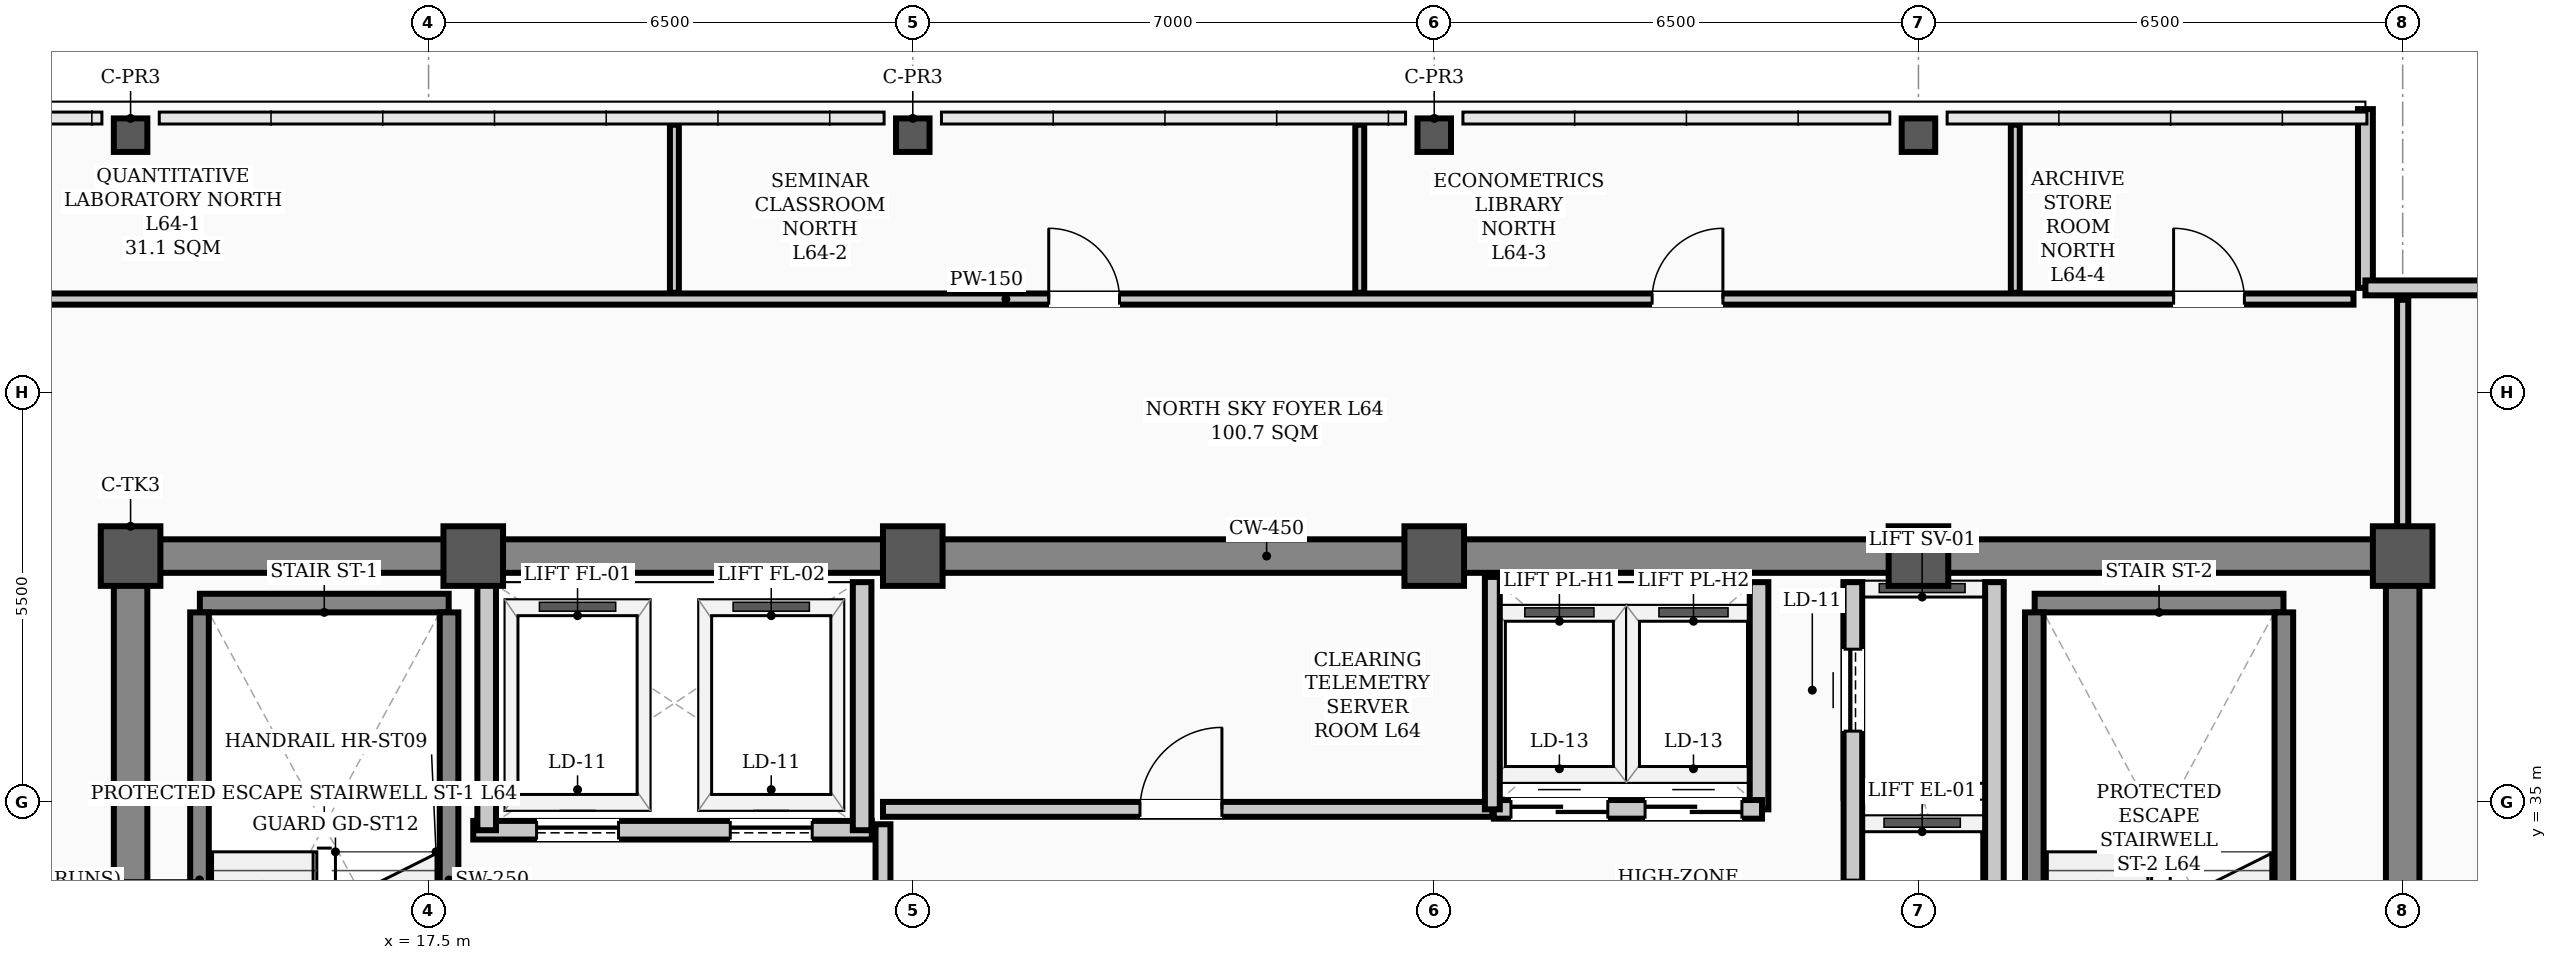
"""IFC4 building model, lengths in metres.
Left out: names, types, materials, properties, quantities, classifications, styles, units other than length and angle.
Written with IfcOpenShell. Run it as: python <this file> out.ifc"""

import sys

from ifc_helpers import new_model, si_unit, direction, frame, frame_2d, origin, origin_2d, place, context, subcontext, project, spatial, rectangle, hollow_rectangle, extrude, element, fill, save


model = new_model("IFC4")
c1 = context("Model", 3, precision=1e-05, world=origin(), true_north=direction((0.0, 1.0)))
c2 = subcontext(c1, "Body", "Model", "MODEL_VIEW")
j1 = project(units=[si_unit("LENGTHUNIT", "METRE"), si_unit("PLANEANGLEUNIT", "RADIAN")], contexts=[c1])
p1 = place(None, origin())
s1 = spatial("IfcSite", under=j1, at=p1, CompositionType="ELEMENT")
p2 = place(p1, origin())
s2 = spatial("IfcBuilding", under=s1, at=p2, CompositionType="ELEMENT")
p3 = place(p2, frame((0.0, 0.0, 257.9)))
s3 = spatial("IfcBuildingStorey", under=s2, at=p3, CompositionType="ELEMENT", Elevation=257.9)
for number, where, z_axis, x_axis in (
    (1, (13.5, 38.3, 0.0), (0.0, 0.0, 1.0), (1.0, 0.0, 0.0)),
    (2, (18.1, 38.3, 0.0), (0.0, 0.0, 1.0), (1.0, 0.0, 0.0)),
    (3, (24.0, 38.3, 0.0), (0.0, 0.0, 1.0), (1.0, 0.0, 0.0)),
    (4, (31.0, 38.3, 0.0), (0.0, 0.0, 1.0), (1.0, 0.0, 0.0)),
    (5, (37.5, 38.3, 0.0), (0.0, 0.0, 1.0), (1.0, 0.0, 0.0)),
    (6, (44.0, 38.3, 0.0), (0.0, 0.0, 1.0), (1.0, 0.0, 0.0)),
):
    element("IfcColumn", number, at=place(p3, frame(where, z_axis=z_axis, x_axis=x_axis)), inside=s3, PredefinedType="COLUMN", context=c2, shape_type="SweptSolid", body=[
        extrude(hollow_rectangle(XDim=0.8, YDim=0.8, WallThickness=0.032, InnerFilletRadius=0.016, OuterFilletRadius=0.048, at=origin_2d()), origin(), (0.0, 0.0, 1.0), 3.9),
    ])
for number, where, z_axis, x_axis in (
    (7, (13.5, 43.95, 0.0), (0.0, 0.0, 1.0), (1.0, 0.0, 0.0)),
    (8, (24.0, 43.95, 0.0), (0.0, 0.0, 1.0), (1.0, 0.0, 0.0)),
    (9, (31.0, 43.95, 0.0), (0.0, 0.0, 1.0), (1.0, 0.0, 0.0)),
    (10, (37.5, 43.95, 0.0), (0.0, 0.0, 1.0), (1.0, 0.0, 0.0)),
):
    element("IfcColumn", number, at=place(p3, frame(where, z_axis=z_axis, x_axis=x_axis)), inside=s3, PredefinedType="COLUMN", context=c2, shape_type="SweptSolid", body=[
        extrude(hollow_rectangle(XDim=0.45, YDim=0.45, WallThickness=0.022, InnerFilletRadius=0.022, OuterFilletRadius=0.044, at=origin_2d()), origin(), (0.0, 0.0, 1.0), 3.9),
    ])
p4 = place(p3, frame((43.5, 44.3, 0.0), z_axis=(0.0, 0.0, 1.0), x_axis=(0.0, -1.0, 0.0)))
e11 = element("IfcWall", 11, at=p4, inside=s3, PredefinedType="PARAPET", context=c2, shape_type="SweptSolid", body=[
    extrude(rectangle(XDim=2.4, YDim=0.2, at=frame_2d((1.2, 0.0))), origin(), (0.0, 0.0, 1.0), 1.2),
])
p5 = place(p3, frame((43.5, 41.9, 0.0), z_axis=(0.0, 0.0, 1.0), x_axis=(1.0, 0.0, 0.0)))
e12 = element("IfcWall", 12, at=p5, inside=s3, PredefinedType="PARAPET", context=c2, shape_type="SweptSolid", body=[
    extrude(rectangle(XDim=2.4, YDim=0.2, at=frame_2d((1.2, 0.0))), origin(), (0.0, 0.0, 1.0), 1.2),
])
p6 = place(p3, frame((13.5, 38.3, 0.0), z_axis=(0.0, 0.0, 1.0), x_axis=(1.0, 0.0, 0.0)))
e13 = element("IfcWall", 13, at=p6, inside=s3, PredefinedType="SHEAR", context=c2, shape_type="SweptSolid", body=[
    extrude(rectangle(XDim=30.5, YDim=0.45, at=frame_2d((15.25, 0.0))), origin(), (0.0, 0.0, 1.0), 3.72),
])
for number, where, z_axis, x_axis in (
    (14, (13.5, 29.35, 0.0), (0.0, 0.0, 1.0), (0.0, 1.0, 0.0)),
    (15, (44.0, 29.35, 0.0), (0.0, 0.0, 1.0), (0.0, 1.0, 0.0)),
):
    element("IfcWall", number, at=place(p3, frame(where, z_axis=z_axis, x_axis=x_axis)), inside=s3, PredefinedType="SHEAR", context=c2, shape_type="SweptSolid", body=[
        extrude(rectangle(XDim=8.6, YDim=0.45, at=frame_2d((4.3, 0.0))), origin(), (0.0, 0.0, 1.0), 3.72),
    ])
p7 = place(p3, frame((14.43, 37.669, 0.0), z_axis=(0.0, 0.0, 1.0), x_axis=(1.0, 0.0, 0.0)))
e16 = element("IfcWall", 16, at=p7, inside=s3, PredefinedType="STANDARD", context=c2, shape_type="SweptSolid", body=[
    extrude(rectangle(XDim=3.34, YDim=0.25, at=frame_2d((1.67, 0.0))), origin(), (0.0, 0.0, 1.0), 3.72),
])
for number, where, z_axis, x_axis in (
    (17, (14.425, 30.36, 0.0), (0.0, 0.0, 1.0), (0.0, 1.0, 0.0)),
    (18, (17.775, 30.36, 0.0), (0.0, 0.0, 1.0), (0.0, 1.0, 0.0)),
):
    element("IfcWall", number, at=place(p3, frame(where, z_axis=z_axis, x_axis=x_axis)), inside=s3, PredefinedType="STANDARD", context=c2, shape_type="SweptSolid", body=[
        extrude(rectangle(XDim=7.184, YDim=0.25, at=frame_2d((3.592, 0.0))), origin(), (0.0, 0.0, 1.0), 3.72),
    ])
p8 = place(p3, frame((39.06, 37.669, 0.0), z_axis=(0.0, 0.0, 1.0), x_axis=(1.0, 0.0, 0.0)))
e19 = element("IfcWall", 19, at=p8, inside=s3, PredefinedType="STANDARD", context=c2, shape_type="SweptSolid", body=[
    extrude(rectangle(XDim=3.34, YDim=0.25, at=frame_2d((1.67, 0.0))), origin(), (0.0, 0.0, 1.0), 3.72),
])
for number, where, z_axis, x_axis in (
    (20, (39.055, 30.36, 0.0), (0.0, 0.0, 1.0), (0.0, 1.0, 0.0)),
    (21, (42.405, 30.36, 0.0), (0.0, 0.0, 1.0), (0.0, 1.0, 0.0)),
):
    element("IfcWall", number, at=place(p3, frame(where, z_axis=z_axis, x_axis=x_axis)), inside=s3, PredefinedType="STANDARD", context=c2, shape_type="SweptSolid", body=[
        extrude(rectangle(XDim=7.184, YDim=0.25, at=frame_2d((3.592, 0.0))), origin(), (0.0, 0.0, 1.0), 3.72),
    ])
p9 = place(p3, frame((18.1, 34.62, 0.0), z_axis=(0.0, 0.0, 1.0), x_axis=(1.0, 0.0, 0.0)))
e22 = element("IfcWall", 22, at=p9, inside=s3, PredefinedType="STANDARD", context=c2, shape_type="SweptSolid", body=[
    extrude(rectangle(XDim=5.35, YDim=0.25, at=frame_2d((2.675, 0.0))), origin(), (0.0, 0.0, 1.0), 3.72),
])
p10 = place(p9, frame((0.85, 0.0, 0.0)))
e23 = element("IfcOpeningElement", 23, at=p10, cuts=e22, PredefinedType="OPENING", context=c2, shape_type="SweptSolid", body=[
    extrude(rectangle(XDim=1.1, YDim=2.08, at=frame_2d((0.55, 1.04))), frame((0.0, 0.135, 0.0), z_axis=(0.0, -1.0, 0.0), x_axis=(1.0, 0.0, 0.0)), (0.0, 0.0, 1.0), 0.27),
])
p11 = place(p9, frame((3.45, 0.0, 0.0)))
e24 = element("IfcOpeningElement", 24, at=p11, cuts=e22, PredefinedType="OPENING", context=c2, shape_type="SweptSolid", body=[
    extrude(rectangle(XDim=1.1, YDim=2.08, at=frame_2d((0.55, 1.04))), frame((0.0, 0.135, 0.0), z_axis=(0.0, -1.0, 0.0), x_axis=(1.0, 0.0, 0.0)), (0.0, 0.0, 1.0), 0.27),
])
p12 = place(p3, frame((36.62, 31.95, 0.0), z_axis=(0.0, 0.0, 1.0), x_axis=(0.0, 1.0, 0.0)))
e25 = element("IfcWall", 25, at=p12, inside=s3, PredefinedType="STANDARD", context=c2, shape_type="SweptSolid", body=[
    extrude(rectangle(XDim=6.0, YDim=0.25, at=frame_2d((3.0, 0.0))), origin(), (0.0, 0.0, 1.0), 3.4),
])
p13 = place(p12, frame((0.9, 0.0, 0.0)))
e26 = element("IfcOpeningElement", 26, at=p13, cuts=e25, PredefinedType="OPENING", context=c2, shape_type="SweptSolid", body=[
    extrude(rectangle(XDim=1.1, YDim=2.08, at=frame_2d((0.55, 1.04))), frame((0.0, 0.135, 0.0), z_axis=(0.0, -1.0, 0.0), x_axis=(1.0, 0.0, 0.0)), (0.0, 0.0, 1.0), 0.27),
])
p14 = place(p12, frame((4.0, 0.0, 0.0)))
e27 = element("IfcOpeningElement", 27, at=p14, cuts=e25, PredefinedType="OPENING", context=c2, shape_type="SweptSolid", body=[
    extrude(rectangle(XDim=1.1, YDim=2.08, at=frame_2d((0.55, 1.04))), frame((0.0, 0.135, 0.0), z_axis=(0.0, -1.0, 0.0), x_axis=(1.0, 0.0, 0.0)), (0.0, 0.0, 1.0), 0.27),
])
p15 = place(p3, frame((38.52, 31.95, 0.0), z_axis=(0.0, 0.0, 1.0), x_axis=(0.0, 1.0, 0.0)))
e28 = element("IfcWall", 28, at=p15, inside=s3, PredefinedType="STANDARD", context=c2, shape_type="SweptSolid", body=[
    extrude(rectangle(XDim=6.0, YDim=0.25, at=frame_2d((3.0, 0.0))), origin(), (0.0, 0.0, 1.0), 3.48),
])
for number, where, z_axis, x_axis in (
    (29, (18.28, 34.62, 0.0), (0.0, 0.0, 1.0), (0.0, 1.0, 0.0)),
    (30, (23.32, 34.62, 0.0), (0.0, 0.0, 1.0), (0.0, 1.0, 0.0)),
):
    element("IfcWall", number, at=place(p3, frame(where, z_axis=z_axis, x_axis=x_axis)), inside=s3, PredefinedType="STANDARD", context=c2, shape_type="SweptSolid", body=[
        extrude(rectangle(XDim=3.33, YDim=0.25, at=frame_2d((1.665, 0.0))), origin(), (0.0, 0.0, 1.0), 3.4),
    ])
p16 = place(p3, frame((35.36, 34.9, 0.0), z_axis=(0.0, 0.0, 1.0), x_axis=(0.0, 1.0, 0.0)))
e31 = element("IfcWall", 31, at=p16, inside=s3, PredefinedType="STANDARD", context=c2, shape_type="SweptSolid", body=[
    extrude(rectangle(XDim=3.05, YDim=0.25, at=frame_2d((1.525, 0.0))), origin(), (0.0, 0.0, 1.0), 3.4),
])
p17 = place(p3, frame((31.8, 34.9, 0.0), z_axis=(0.0, 0.0, 1.0), x_axis=(1.0, 0.0, 0.0)))
e32 = element("IfcWall", 32, at=p17, inside=s3, PredefinedType="STANDARD", context=c2, shape_type="SweptSolid", body=[
    extrude(rectangle(XDim=3.6, YDim=0.25, at=frame_2d((1.8, 0.0))), origin(), (0.0, 0.0, 1.0), 3.72),
])
p18 = place(p17, frame((0.23, 0.0, 0.0)))
e33 = element("IfcOpeningElement", 33, at=p18, cuts=e32, PredefinedType="OPENING", context=c2, shape_type="SweptSolid", body=[
    extrude(rectangle(XDim=1.3, YDim=2.08, at=frame_2d((0.65, 1.04))), frame((0.0, 0.135, 0.0), z_axis=(0.0, -1.0, 0.0), x_axis=(1.0, 0.0, 0.0)), (0.0, 0.0, 1.0), 0.27),
])
p19 = place(p17, frame((2.03, 0.0, 0.0)))
e34 = element("IfcOpeningElement", 34, at=p19, cuts=e32, PredefinedType="OPENING", context=c2, shape_type="SweptSolid", body=[
    extrude(rectangle(XDim=1.3, YDim=2.08, at=frame_2d((0.65, 1.04))), frame((0.0, 0.135, 0.0), z_axis=(0.0, -1.0, 0.0), x_axis=(1.0, 0.0, 0.0)), (0.0, 0.0, 1.0), 0.27),
])
p20 = place(p3, frame((23.6, 34.9, 0.0), z_axis=(0.0, 0.0, 1.0), x_axis=(1.0, 0.0, 0.0)))
e35 = element("IfcWall", 35, at=p20, inside=s3, PredefinedType="STANDARD", context=c2, shape_type="SweptSolid", body=[
    extrude(rectangle(XDim=8.18, YDim=0.2, at=frame_2d((4.09, 0.0))), origin(), (0.0, 0.0, 1.0), 3.72),
])
p21 = place(p20, frame((3.45, 0.0, 0.0)))
e36 = element("IfcOpeningElement", 36, at=p21, cuts=e35, PredefinedType="OPENING", context=c2, shape_type="SweptSolid", body=[
    extrude(rectangle(XDim=1.1, YDim=2.08, at=frame_2d((0.55, 1.04))), frame((0.0, 0.11, 0.0), z_axis=(0.0, -1.0, 0.0), x_axis=(1.0, 0.0, 0.0)), (0.0, 0.0, 1.0), 0.22),
])
p22 = place(p3, frame((7.16, 41.75, 0.0), z_axis=(0.0, 0.0, 1.0), x_axis=(1.0, 0.0, 0.0)))
e37 = element("IfcWall", 37, at=p22, inside=s3, PredefinedType="PARTITIONING", context=c2, shape_type="SweptSolid", body=[
    extrude(rectangle(XDim=36.18, YDim=0.15, at=frame_2d((18.09, 0.0))), origin(), (0.0, 0.0, 1.0), 3.2),
])
p23 = place(p22, frame((3.855, 0.0, 0.0)))
e38 = element("IfcOpeningElement", 38, at=p23, cuts=e37, PredefinedType="OPENING", context=c2, shape_type="SweptSolid", body=[
    extrude(rectangle(XDim=0.95, YDim=2.08, at=frame_2d((0.475, 1.04))), frame((0.0, 0.085, 0.0), z_axis=(0.0, -1.0, 0.0), x_axis=(1.0, 0.0, 0.0)), (0.0, 0.0, 1.0), 0.17),
])
p24 = place(p22, frame((18.665, 0.0, 0.0)))
e39 = element("IfcOpeningElement", 39, at=p24, cuts=e37, PredefinedType="OPENING", context=c2, shape_type="SweptSolid", body=[
    extrude(rectangle(XDim=0.95, YDim=2.08, at=frame_2d((0.475, 1.04))), frame((0.0, 0.085, 0.0), z_axis=(0.0, -1.0, 0.0), x_axis=(1.0, 0.0, 0.0)), (0.0, 0.0, 1.0), 0.17),
])
p25 = place(p22, frame((26.765, 0.0, 0.0)))
e40 = element("IfcOpeningElement", 40, at=p25, cuts=e37, PredefinedType="OPENING", context=c2, shape_type="SweptSolid", body=[
    extrude(rectangle(XDim=0.95, YDim=2.08, at=frame_2d((0.475, 1.04))), frame((0.0, 0.085, 0.0), z_axis=(0.0, -1.0, 0.0), x_axis=(1.0, 0.0, 0.0)), (0.0, 0.0, 1.0), 0.17),
])
p26 = place(p22, frame((33.765, 0.0, 0.0)))
e41 = element("IfcOpeningElement", 41, at=p26, cuts=e37, PredefinedType="OPENING", context=c2, shape_type="SweptSolid", body=[
    extrude(rectangle(XDim=0.95, YDim=2.08, at=frame_2d((0.475, 1.04))), frame((0.0, 0.085, 0.0), z_axis=(0.0, -1.0, 0.0), x_axis=(1.0, 0.0, 0.0)), (0.0, 0.0, 1.0), 0.17),
])
p27 = place(p3, frame((23.6, 29.235, 0.0), z_axis=(0.0, 0.0, 1.0), x_axis=(0.0, 1.0, 0.0)))
e42 = element("IfcWall", 42, at=p27, inside=s3, PredefinedType="STANDARD", context=c2, shape_type="SweptSolid", body=[
    extrude(rectangle(XDim=5.465, YDim=0.2, at=frame_2d((2.732, 0.0))), origin(), (0.0, 0.0, 1.0), 3.2),
])
p28 = place(p3, frame((44.0, 38.535, 0.0), z_axis=(0.0, 0.0, 1.0), x_axis=(0.0, 1.0, 0.0)))
e43 = element("IfcWall", 43, at=p28, inside=s3, PredefinedType="PARTITIONING", context=c2, shape_type="SweptSolid", body=[
    extrude(rectangle(XDim=3.205, YDim=0.15, at=frame_2d((1.603, 0.0))), origin(), (0.0, 0.0, 1.0), 3.72),
])
for number, where, z_axis, x_axis in (
    (44, (20.8, 41.835, 0.0), (0.0, 0.0, 1.0), (0.0, 1.0, 0.0)),
    (45, (30.0, 41.835, 0.0), (0.0, 0.0, 1.0), (0.0, 1.0, 0.0)),
):
    element("IfcWall", number, at=place(p3, frame(where, z_axis=z_axis, x_axis=x_axis)), inside=s3, PredefinedType="PARTITIONING", context=c2, shape_type="SweptSolid", body=[
        extrude(rectangle(XDim=2.255, YDim=0.12, at=frame_2d((1.127, 0.0))), origin(), (0.0, 0.0, 1.0), 3.212),
    ])
p29 = place(p3, frame((38.8, 41.835, 0.0), z_axis=(0.0, 0.0, 1.0), x_axis=(0.0, 1.0, 0.0)))
e46 = element("IfcWall", 46, at=p29, inside=s3, PredefinedType="PARTITIONING", context=c2, shape_type="SweptSolid", body=[
    extrude(rectangle(XDim=2.255, YDim=0.12, at=frame_2d((1.127, 0.0))), origin(), (0.0, 0.0, 1.0), 3.72),
])
p30 = place(p3, frame((31.78, 34.9, 0.0), z_axis=(0.0, 0.0, 1.0), x_axis=(0.0, 1.0, 0.0)))
e47 = element("IfcWall", 47, at=p30, inside=s3, PredefinedType="STANDARD", context=c2, shape_type="SweptSolid", body=[
    extrude(rectangle(XDim=3.12, YDim=0.2, at=frame_2d((1.56, 0.0))), origin(), (0.0, 0.0, 1.0), 3.4),
])
p31 = place(p21, origin())
e48 = element("IfcDoor", 48, at=p31, inside=s3, OperationType="SINGLE_SWING_RIGHT", PredefinedType="DOOR", context=c2, shape_type="SweptSolid", body=[
    extrude(rectangle(XDim=1.1, YDim=2.08, at=frame_2d((0.55, 1.04))), frame((0.0, 0.025, 0.0), z_axis=(0.0, -1.0, 0.0), x_axis=(1.0, 0.0, 0.0)), (0.0, 0.0, 1.0), 0.05),
])
fill(e36, e48)
p32 = place(p24, origin())
e49 = element("IfcDoor", 49, at=p32, inside=s3, OperationType="SINGLE_SWING_LEFT", PredefinedType="DOOR", context=c2, shape_type="SweptSolid", body=[
    extrude(rectangle(XDim=0.95, YDim=2.08, at=frame_2d((0.475, 1.04))), frame((0.0, 0.025, 0.0), z_axis=(0.0, -1.0, 0.0), x_axis=(1.0, 0.0, 0.0)), (0.0, 0.0, 1.0), 0.05),
])
fill(e39, e49)
p33 = place(p25, origin())
e50 = element("IfcDoor", 50, at=p33, inside=s3, OperationType="SINGLE_SWING_RIGHT", PredefinedType="DOOR", context=c2, shape_type="SweptSolid", body=[
    extrude(rectangle(XDim=0.95, YDim=2.08, at=frame_2d((0.475, 1.04))), frame((0.0, 0.025, 0.0), z_axis=(0.0, -1.0, 0.0), x_axis=(1.0, 0.0, 0.0)), (0.0, 0.0, 1.0), 0.05),
])
fill(e40, e50)
p34 = place(p26, origin())
e51 = element("IfcDoor", 51, at=p34, inside=s3, OperationType="SINGLE_SWING_LEFT", PredefinedType="DOOR", context=c2, shape_type="SweptSolid", body=[
    extrude(rectangle(XDim=0.95, YDim=2.08, at=frame_2d((0.475, 1.04))), frame((0.0, 0.025, 0.0), z_axis=(0.0, -1.0, 0.0), x_axis=(1.0, 0.0, 0.0)), (0.0, 0.0, 1.0), 0.05),
])
fill(e41, e51)
p35 = place(p10, origin())
e52 = element("IfcDoor", 52, at=p35, inside=s3, OperationType="SLIDING_TO_LEFT", PredefinedType="DOOR", context=c2, shape_type="SweptSolid", body=[
    extrude(rectangle(XDim=1.1, YDim=2.08, at=frame_2d((0.55, 1.04))), frame((0.0, 0.025, 0.0), z_axis=(0.0, -1.0, 0.0), x_axis=(1.0, 0.0, 0.0)), (0.0, 0.0, 1.0), 0.05),
])
fill(e23, e52)
p36 = place(p11, origin())
e53 = element("IfcDoor", 53, at=p36, inside=s3, OperationType="SLIDING_TO_LEFT", PredefinedType="DOOR", context=c2, shape_type="SweptSolid", body=[
    extrude(rectangle(XDim=1.1, YDim=2.08, at=frame_2d((0.55, 1.04))), frame((0.0, 0.025, 0.0), z_axis=(0.0, -1.0, 0.0), x_axis=(1.0, 0.0, 0.0)), (0.0, 0.0, 1.0), 0.05),
])
fill(e24, e53)
p37 = place(p14, origin())
e54 = element("IfcDoor", 54, at=p37, inside=s3, OperationType="SLIDING_TO_LEFT", PredefinedType="DOOR", context=c2, shape_type="SweptSolid", body=[
    extrude(rectangle(XDim=1.1, YDim=2.08, at=frame_2d((0.55, 1.04))), frame((0.0, 0.025, 0.0), z_axis=(0.0, -1.0, 0.0), x_axis=(1.0, 0.0, 0.0)), (0.0, 0.0, 1.0), 0.05),
])
fill(e27, e54)
p38 = place(p18, origin())
e55 = element("IfcDoor", 55, at=p38, inside=s3, OperationType="DOUBLE_DOOR_SLIDING", PredefinedType="DOOR", context=c2, shape_type="SweptSolid", body=[
    extrude(rectangle(XDim=1.3, YDim=2.08, at=frame_2d((0.65, 1.04))), frame((0.0, 0.025, 0.0), z_axis=(0.0, -1.0, 0.0), x_axis=(1.0, 0.0, 0.0)), (0.0, 0.0, 1.0), 0.05),
])
fill(e33, e55)
p39 = place(p19, origin())
e56 = element("IfcDoor", 56, at=p39, inside=s3, OperationType="DOUBLE_DOOR_SLIDING", PredefinedType="DOOR", context=c2, shape_type="SweptSolid", body=[
    extrude(rectangle(XDim=1.3, YDim=2.08, at=frame_2d((0.65, 1.04))), frame((0.0, 0.025, 0.0), z_axis=(0.0, -1.0, 0.0), x_axis=(1.0, 0.0, 0.0)), (0.0, 0.0, 1.0), 0.05),
])
fill(e34, e56)
save(model, sys.argv[1])
